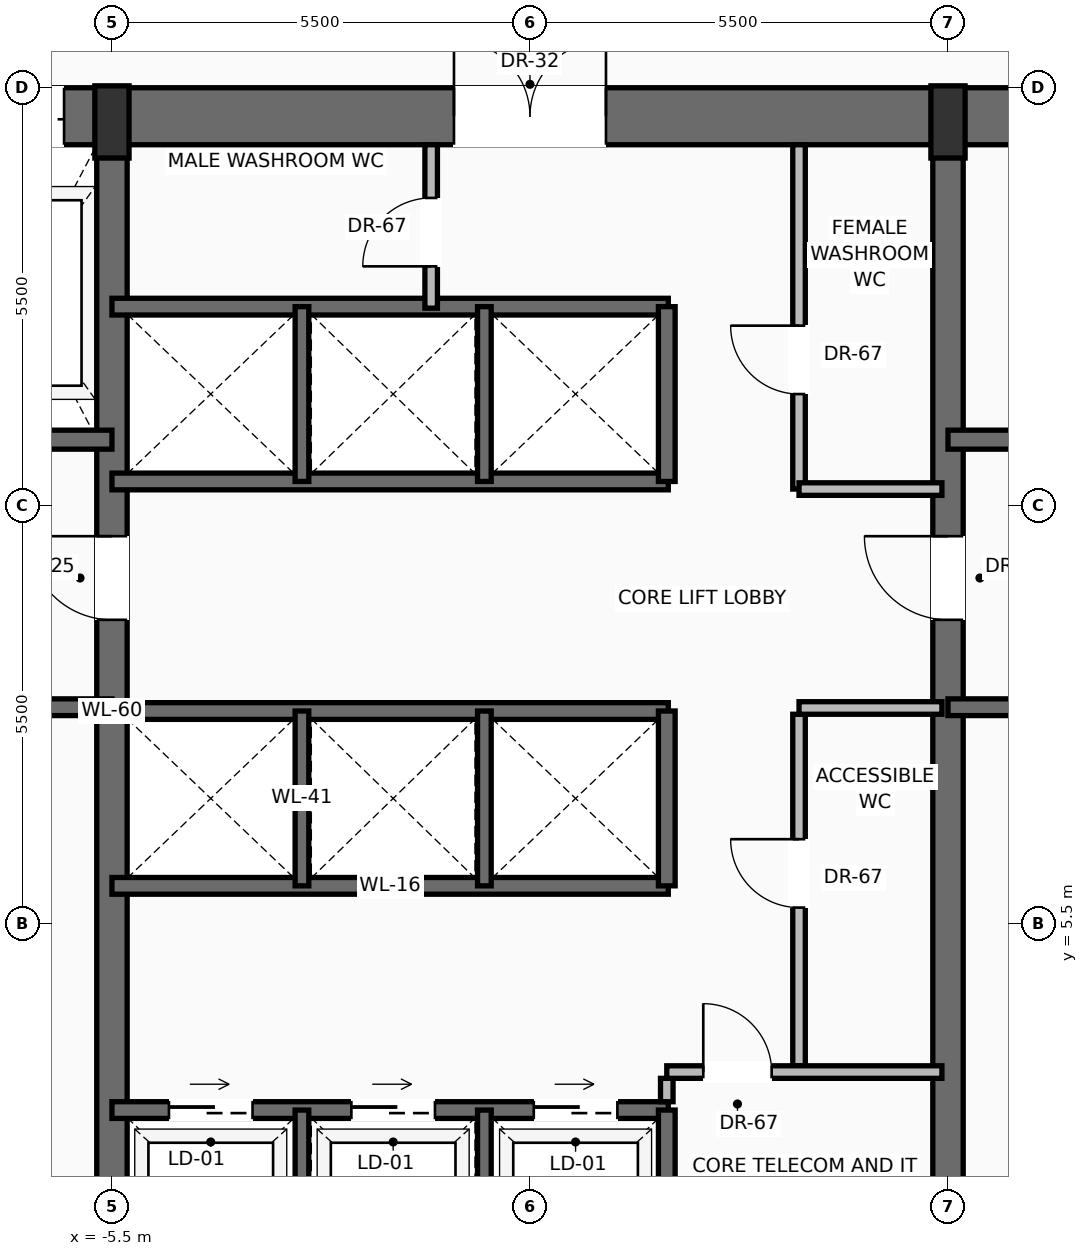
"""IFC4 building model, lengths in metres.
Left out: names, types, materials, properties, quantities, classifications, styles, units other than length and angle.
Written with IfcOpenShell. Run it as: python <this file> out.ifc"""

import sys

from ifc_helpers import new_model, si_unit, direction, frame, frame_2d, origin, origin_2d, place, context, subcontext, project, spatial, rectangle, extrude, source, transform, mapped, element, fill, save


model = new_model("IFC4")
c1 = context("Model", 3, precision=1e-05, world=origin(), true_north=direction((0.0, 1.0)))
c2 = subcontext(c1, "Body", "Model", "MODEL_VIEW")
j1 = project(units=[si_unit("LENGTHUNIT", "METRE"), si_unit("PLANEANGLEUNIT", "RADIAN")], contexts=[c1])
p1 = place(None, origin())
s1 = spatial("IfcSite", under=j1, at=p1, CompositionType="ELEMENT")
p2 = place(p1, origin())
s2 = spatial("IfcBuilding", under=s1, at=p2, CompositionType="ELEMENT")
p3 = place(p2, frame((0.0, 0.0, 106.2)))
s3 = spatial("IfcBuildingStorey", under=s2, at=p3, CompositionType="ELEMENT", Elevation=106.2)
p4 = place(p3, frame((-10.9, 16.125, 0.0), z_axis=(0.0, 0.0, 1.0), x_axis=(1.0, 0.0, 0.0)))
e1 = element("IfcWall", 1, at=p4, inside=s3, PredefinedType="SHEAR", context=c2, shape_type="SweptSolid", body=[
    extrude(rectangle(XDim=21.8, YDim=0.75, at=frame_2d((10.9, 0.0))), origin(), (0.0, 0.0, 1.0), 3.45),
])
p5 = place(p4, frame((3.47, 0.0, 0.0)))
e2 = element("IfcOpeningElement", 2, at=p5, cuts=e1, PredefinedType="OPENING", context=c2, shape_type="SweptSolid", body=[
    extrude(rectangle(XDim=1.3, YDim=2.3, at=frame_2d((0.65, 1.15))), frame((0.0, 0.385, 0.0), z_axis=(0.0, -1.0, 0.0), x_axis=(1.0, 0.0, 0.0)), (0.0, 0.0, 1.0), 0.77),
])
p6 = place(p4, frame((9.9, 0.0, 0.0)))
e3 = element("IfcOpeningElement", 3, at=p6, cuts=e1, PredefinedType="OPENING", context=c2, shape_type="SweptSolid", body=[
    extrude(rectangle(XDim=2.0, YDim=2.4, at=frame_2d((1.0, 1.2))), frame((0.0, 0.385, 0.0), z_axis=(0.0, -1.0, 0.0), x_axis=(1.0, 0.0, 0.0)), (0.0, 0.0, 1.0), 0.77),
])
p7 = place(p3, frame((-5.5, 0.475, 0.0), z_axis=(0.0, 0.0, 1.0), x_axis=(0.0, 1.0, 0.0)))
e4 = element("IfcWall", 4, at=p7, inside=s3, PredefinedType="SHEAR", context=c2, shape_type="SweptSolid", body=[
    extrude(rectangle(XDim=15.65, YDim=0.4, at=frame_2d((7.825, 0.0))), origin(), (0.0, 0.0, 1.0), 3.45),
])
p8 = place(p7, frame((9.025, 0.0, 0.0)))
e5 = element("IfcOpeningElement", 5, at=p8, cuts=e4, PredefinedType="OPENING", context=c2, shape_type="SweptSolid", body=[
    extrude(rectangle(XDim=1.1, YDim=2.2, at=frame_2d((0.55, 1.1))), frame((0.0, 0.21, 0.0), z_axis=(0.0, -1.0, 0.0), x_axis=(1.0, 0.0, 0.0)), (0.0, 0.0, 1.0), 0.42),
])
p9 = place(p3, frame((5.5, 0.475, 0.0), z_axis=(0.0, 0.0, 1.0), x_axis=(0.0, 1.0, 0.0)))
e6 = element("IfcWall", 6, at=p9, inside=s3, PredefinedType="SHEAR", context=c2, shape_type="SweptSolid", body=[
    extrude(rectangle(XDim=15.65, YDim=0.4, at=frame_2d((7.825, 0.0))), origin(), (0.0, 0.0, 1.0), 3.45),
])
p10 = place(p9, frame((9.025, 0.0, 0.0)))
e7 = element("IfcOpeningElement", 7, at=p10, cuts=e6, PredefinedType="OPENING", context=c2, shape_type="SweptSolid", body=[
    extrude(rectangle(XDim=1.1, YDim=2.2, at=frame_2d((0.55, 1.1))), frame((0.0, 0.21, 0.0), z_axis=(0.0, -1.0, 0.0), x_axis=(1.0, 0.0, 0.0)), (0.0, 0.0, 1.0), 0.42),
])
m1 = source(origin(), c2, "Body", "SweptSolid", [
    extrude(rectangle(XDim=0.45, YDim=0.95, at=origin_2d()), origin(), (0.0, 0.0, 1.0), 3.7),
])
for number, where, z_axis, x_axis in (
    (8, (-5.5, 16.05, 0.0), (0.0, 0.0, 1.0), (1.0, 0.0, 0.0)),
    (9, (5.5, 16.05, 0.0), (0.0, 0.0, 1.0), (1.0, 0.0, 0.0)),
):
    element("IfcColumn", number, at=place(p3, frame(where, z_axis=z_axis, x_axis=x_axis)), inside=s3, PredefinedType="PILASTER", context=c2, shape_type="MappedRepresentation", body=[
        mapped(m1, transform((0.0, 0.0, 0.0), scale=1.0)),
    ])
p11 = place(p3, frame((-5.5, 8.35, 0.0), z_axis=(0.0, 0.0, 1.0), x_axis=(-1.0, 0.0, 0.0)))
e10 = element("IfcWall", 10, at=p11, inside=s3, PredefinedType="SOLIDWALL", context=c2, shape_type="SweptSolid", body=[
    extrude(rectangle(XDim=4.65, YDim=0.22, at=frame_2d((2.325, 0.0))), origin(), (0.0, 0.0, 1.0), 3.45),
])
p12 = place(p11, frame((2.5, 0.0, 0.0)))
e11 = element("IfcOpeningElement", 11, at=p12, cuts=e10, PredefinedType="OPENING", context=c2, shape_type="SweptSolid", body=[
    extrude(rectangle(XDim=1.15, YDim=2.2, at=frame_2d((0.575, 1.1))), frame((0.0, 0.12, 0.0), z_axis=(0.0, -1.0, 0.0), x_axis=(1.0, 0.0, 0.0)), (0.0, 0.0, 1.0), 0.24),
])
p13 = place(p3, frame((-5.5, 11.87, 0.0), z_axis=(0.0, 0.0, 1.0), x_axis=(-1.0, 0.0, 0.0)))
e12 = element("IfcWall", 12, at=p13, inside=s3, PredefinedType="SOLIDWALL", context=c2, shape_type="SweptSolid", body=[
    extrude(rectangle(XDim=4.65, YDim=0.25, at=frame_2d((2.325, 0.0))), origin(), (0.0, 0.0, 1.0), 3.45),
])
p14 = place(p13, frame((2.95, 0.0, 0.0)))
e13 = element("IfcOpeningElement", 13, at=p14, cuts=e12, PredefinedType="OPENING", context=c2, shape_type="SweptSolid", body=[
    extrude(rectangle(XDim=1.2, YDim=2.25, at=frame_2d((0.6, 1.125))), frame((0.0, 0.135, 0.0), z_axis=(0.0, -1.0, 0.0), x_axis=(1.0, 0.0, 0.0)), (0.0, 0.0, 1.0), 0.27),
])
p15 = place(p3, frame((10.15, 8.35, 0.0), z_axis=(0.0, 0.0, 1.0), x_axis=(-1.0, 0.0, 0.0)))
e14 = element("IfcWall", 14, at=p15, inside=s3, PredefinedType="SOLIDWALL", context=c2, shape_type="SweptSolid", body=[
    extrude(rectangle(XDim=4.65, YDim=0.22, at=frame_2d((2.325, 0.0))), origin(), (0.0, 0.0, 1.0), 3.45),
])
p16 = place(p15, frame((1.0, 0.0, 0.0)))
e15 = element("IfcOpeningElement", 15, at=p16, cuts=e14, PredefinedType="OPENING", context=c2, shape_type="SweptSolid", body=[
    extrude(rectangle(XDim=1.15, YDim=2.2, at=frame_2d((0.575, 1.1))), frame((0.0, 0.12, 0.0), z_axis=(0.0, -1.0, 0.0), x_axis=(1.0, 0.0, 0.0)), (0.0, 0.0, 1.0), 0.24),
])
p17 = place(p3, frame((10.15, 11.87, 0.0), z_axis=(0.0, 0.0, 1.0), x_axis=(-1.0, 0.0, 0.0)))
e16 = element("IfcWall", 16, at=p17, inside=s3, PredefinedType="SOLIDWALL", context=c2, shape_type="SweptSolid", body=[
    extrude(rectangle(XDim=4.65, YDim=0.25, at=frame_2d((2.325, 0.0))), origin(), (0.0, 0.0, 1.0), 3.45),
])
p18 = place(p17, frame((0.5, 0.0, 0.0)))
e17 = element("IfcOpeningElement", 17, at=p18, cuts=e16, PredefinedType="OPENING", context=c2, shape_type="SweptSolid", body=[
    extrude(rectangle(XDim=1.2, YDim=2.25, at=frame_2d((0.6, 1.125))), frame((0.0, 0.135, 0.0), z_axis=(0.0, -1.0, 0.0), x_axis=(1.0, 0.0, 0.0)), (0.0, 0.0, 1.0), 0.27),
])
p19 = place(p3, frame((-5.5, 3.05, 0.0), z_axis=(0.0, 0.0, 1.0), x_axis=(1.0, 0.0, 0.0)))
e18 = element("IfcWall", 18, at=p19, inside=s3, PredefinedType="SOLIDWALL", context=c2, shape_type="SweptSolid", body=[
    extrude(rectangle(XDim=7.32, YDim=0.22, at=frame_2d((3.66, 0.0))), origin(), (0.0, 0.0, 1.0), 3.45),
])
p20 = place(p19, frame((0.75, 0.0, 0.0)))
e19 = element("IfcOpeningElement", 19, at=p20, cuts=e18, PredefinedType="OPENING", context=c2, shape_type="SweptSolid", body=[
    extrude(rectangle(XDim=1.1, YDim=2.2, at=frame_2d((0.55, 1.1))), frame((0.0, 0.12, 0.0), z_axis=(0.0, -1.0, 0.0), x_axis=(1.0, 0.0, 0.0)), (0.0, 0.0, 1.0), 0.24),
])
p21 = place(p19, frame((3.15, 0.0, 0.0)))
e20 = element("IfcOpeningElement", 20, at=p21, cuts=e18, PredefinedType="OPENING", context=c2, shape_type="SweptSolid", body=[
    extrude(rectangle(XDim=1.1, YDim=2.2, at=frame_2d((0.55, 1.1))), frame((0.0, 0.12, 0.0), z_axis=(0.0, -1.0, 0.0), x_axis=(1.0, 0.0, 0.0)), (0.0, 0.0, 1.0), 0.24),
])
p22 = place(p19, frame((5.55, 0.0, 0.0)))
e21 = element("IfcOpeningElement", 21, at=p22, cuts=e18, PredefinedType="OPENING", context=c2, shape_type="SweptSolid", body=[
    extrude(rectangle(XDim=1.1, YDim=2.2, at=frame_2d((0.55, 1.1))), frame((0.0, 0.12, 0.0), z_axis=(0.0, -1.0, 0.0), x_axis=(1.0, 0.0, 0.0)), (0.0, 0.0, 1.0), 0.24),
])
p23 = place(p3, frame((1.8, 0.85, 0.0), z_axis=(0.0, 0.0, 1.0), x_axis=(0.0, 1.0, 0.0)))
e22 = element("IfcWall", 22, at=p23, inside=s3, PredefinedType="SOLIDWALL", context=c2, shape_type="SweptSolid", body=[
    extrude(rectangle(XDim=2.2, YDim=0.22, at=frame_2d((1.1, 0.0))), origin(), (0.0, 0.0, 1.0), 3.45),
])
for number, where, z_axis, x_axis in (
    (23, (-3.0, 0.85, 0.0), (0.0, 0.0, 1.0), (0.0, 1.0, 0.0)),
    (24, (-0.6, 0.85, 0.0), (0.0, 0.0, 1.0), (0.0, 1.0, 0.0)),
):
    element("IfcWall", number, at=place(p3, frame(where, z_axis=z_axis, x_axis=x_axis)), inside=s3, PredefinedType="SOLIDWALL", context=c2, shape_type="SweptSolid", body=[
        extrude(rectangle(XDim=2.2, YDim=0.18, at=frame_2d((1.1, 0.0))), origin(), (0.0, 0.0, 1.0), 3.45),
    ])
p24 = place(p3, frame((1.8, 3.16, 0.0), z_axis=(0.0, 0.0, 1.0), x_axis=(0.0, 1.0, 0.0)))
e25 = element("IfcWall", 25, at=p24, inside=s3, PredefinedType="PARTITIONING", context=c2, shape_type="SweptSolid", body=[
    extrude(rectangle(XDim=0.308, YDim=0.165, at=frame_2d((0.154, 0.0))), origin(), (0.0, 0.0, 1.0), 3.442),
])
p25 = place(p3, frame((3.54, 3.633, 0.0), z_axis=(0.0, 0.0, 1.0), x_axis=(0.0, 1.0, 0.0)))
e26 = element("IfcWall", 26, at=p25, inside=s3, PredefinedType="PARTITIONING", context=c2, shape_type="SweptSolid", body=[
    extrude(rectangle(XDim=4.625, YDim=0.165, at=frame_2d((2.312, 0.0))), origin(), (0.0, 0.0, 1.0), 3.442),
])
p26 = place(p25, frame((2.081, 0.0, 0.0)))
e27 = element("IfcOpeningElement", 27, at=p26, cuts=e26, PredefinedType="OPENING", context=c2, shape_type="SweptSolid", body=[
    extrude(rectangle(XDim=0.9, YDim=2.1, at=frame_2d((0.45, 1.05))), frame((0.0, 0.093, 0.0), z_axis=(0.0, -1.0, 0.0), x_axis=(1.0, 0.0, 0.0)), (0.0, 0.0, 1.0), 0.185),
])
p27 = place(p3, frame((3.54, 8.34, 0.0), z_axis=(0.0, 0.0, 1.0), x_axis=(1.0, 0.0, 0.0)))
e28 = element("IfcWall", 28, at=p27, inside=s3, PredefinedType="PARTITIONING", context=c2, shape_type="SweptSolid", body=[
    extrude(rectangle(XDim=1.88, YDim=0.165, at=frame_2d((0.94, 0.0))), origin(), (0.0, 0.0, 1.0), 3.442),
])
p28 = place(p3, frame((1.8, 3.55, 0.0), z_axis=(0.0, 0.0, 1.0), x_axis=(1.0, 0.0, 0.0)))
e29 = element("IfcWall", 29, at=p28, inside=s3, PredefinedType="PARTITIONING", context=c2, shape_type="SweptSolid", body=[
    extrude(rectangle(XDim=3.62, YDim=0.165, at=frame_2d((1.81, 0.0))), origin(), (0.0, 0.0, 1.0), 3.442),
])
p29 = place(p28, frame((0.48, 0.0, 0.0)))
e30 = element("IfcOpeningElement", 30, at=p29, cuts=e29, PredefinedType="OPENING", context=c2, shape_type="SweptSolid", body=[
    extrude(rectangle(XDim=0.9, YDim=2.1, at=frame_2d((0.45, 1.05))), frame((0.0, 0.093, 0.0), z_axis=(0.0, -1.0, 0.0), x_axis=(1.0, 0.0, 0.0)), (0.0, 0.0, 1.0), 0.185),
])
for number, where, z_axis, x_axis in (
    (31, (-5.5, 6.0, 0.0), (0.0, 0.0, 1.0), (1.0, 0.0, 0.0)),
    (32, (-5.5, 8.3, 0.0), (0.0, 0.0, 1.0), (1.0, 0.0, 0.0)),
):
    element("IfcWall", number, at=place(p3, frame(where, z_axis=z_axis, x_axis=x_axis)), inside=s3, PredefinedType="SOLIDWALL", context=c2, shape_type="SweptSolid", body=[
        extrude(rectangle(XDim=7.32, YDim=0.22, at=frame_2d((3.66, 0.0))), origin(), (0.0, 0.0, 1.0), 3.45),
    ])
p30 = place(p3, frame((1.8, 6.0, 0.0), z_axis=(0.0, 0.0, 1.0), x_axis=(0.0, 1.0, 0.0)))
e33 = element("IfcWall", 33, at=p30, inside=s3, PredefinedType="SOLIDWALL", context=c2, shape_type="SweptSolid", body=[
    extrude(rectangle(XDim=2.3, YDim=0.22, at=frame_2d((1.15, 0.0))), origin(), (0.0, 0.0, 1.0), 3.45),
])
for number, where, z_axis, x_axis in (
    (34, (-3.0, 6.0, 0.0), (0.0, 0.0, 1.0), (0.0, 1.0, 0.0)),
    (35, (-0.6, 6.0, 0.0), (0.0, 0.0, 1.0), (0.0, 1.0, 0.0)),
):
    element("IfcWall", number, at=place(p3, frame(where, z_axis=z_axis, x_axis=x_axis)), inside=s3, PredefinedType="SOLIDWALL", context=c2, shape_type="SweptSolid", body=[
        extrude(rectangle(XDim=2.3, YDim=0.18, at=frame_2d((1.15, 0.0))), origin(), (0.0, 0.0, 1.0), 3.45),
    ])
for number, where, z_axis, x_axis in (
    (36, (-5.5, 11.32, 0.0), (0.0, 0.0, 1.0), (1.0, 0.0, 0.0)),
    (37, (-5.5, 13.62, 0.0), (0.0, 0.0, 1.0), (1.0, 0.0, 0.0)),
):
    element("IfcWall", number, at=place(p3, frame(where, z_axis=z_axis, x_axis=x_axis)), inside=s3, PredefinedType="SOLIDWALL", context=c2, shape_type="SweptSolid", body=[
        extrude(rectangle(XDim=7.32, YDim=0.22, at=frame_2d((3.66, 0.0))), origin(), (0.0, 0.0, 1.0), 3.45),
    ])
p31 = place(p3, frame((1.8, 11.32, 0.0), z_axis=(0.0, 0.0, 1.0), x_axis=(0.0, 1.0, 0.0)))
e38 = element("IfcWall", 38, at=p31, inside=s3, PredefinedType="SOLIDWALL", context=c2, shape_type="SweptSolid", body=[
    extrude(rectangle(XDim=2.3, YDim=0.22, at=frame_2d((1.15, 0.0))), origin(), (0.0, 0.0, 1.0), 3.45),
])
for number, where, z_axis, x_axis in (
    (39, (-3.0, 11.32, 0.0), (0.0, 0.0, 1.0), (0.0, 1.0, 0.0)),
    (40, (-0.6, 11.32, 0.0), (0.0, 0.0, 1.0), (0.0, 1.0, 0.0)),
):
    element("IfcWall", number, at=place(p3, frame(where, z_axis=z_axis, x_axis=x_axis)), inside=s3, PredefinedType="SOLIDWALL", context=c2, shape_type="SweptSolid", body=[
        extrude(rectangle(XDim=2.3, YDim=0.18, at=frame_2d((1.15, 0.0))), origin(), (0.0, 0.0, 1.0), 3.45),
    ])
p32 = place(p3, frame((-1.3, 13.6, 0.0), z_axis=(0.0, 0.0, 1.0), x_axis=(0.0, 1.0, 0.0)))
e41 = element("IfcWall", 41, at=p32, inside=s3, PredefinedType="PARTITIONING", context=c2, shape_type="SweptSolid", body=[
    extrude(rectangle(XDim=2.15, YDim=0.165, at=frame_2d((1.075, 0.0))), origin(), (0.0, 0.0, 1.0), 3.442),
])
p33 = place(p32, frame((0.55, 0.0, 0.0)))
e42 = element("IfcOpeningElement", 42, at=p33, cuts=e41, PredefinedType="OPENING", context=c2, shape_type="SweptSolid", body=[
    extrude(rectangle(XDim=0.9, YDim=2.1, at=frame_2d((0.45, 1.05))), frame((0.0, 0.093, 0.0), z_axis=(0.0, -1.0, 0.0), x_axis=(1.0, 0.0, 0.0)), (0.0, 0.0, 1.0), 0.185),
])
p34 = place(p3, frame((3.54, 11.22, 0.0), z_axis=(0.0, 0.0, 1.0), x_axis=(0.0, 1.0, 0.0)))
e43 = element("IfcWall", 43, at=p34, inside=s3, PredefinedType="PARTITIONING", context=c2, shape_type="SweptSolid", body=[
    extrude(rectangle(XDim=4.53, YDim=0.165, at=frame_2d((2.265, 0.0))), origin(), (0.0, 0.0, 1.0), 3.442),
])
p35 = place(p34, frame((1.25, 0.0, 0.0)))
e44 = element("IfcOpeningElement", 44, at=p35, cuts=e43, PredefinedType="OPENING", context=c2, shape_type="SweptSolid", body=[
    extrude(rectangle(XDim=0.9, YDim=2.1, at=frame_2d((0.45, 1.05))), frame((0.0, 0.093, 0.0), z_axis=(0.0, -1.0, 0.0), x_axis=(1.0, 0.0, 0.0)), (0.0, 0.0, 1.0), 0.185),
])
p36 = place(p3, frame((3.54, 11.22, 0.0), z_axis=(0.0, 0.0, 1.0), x_axis=(1.0, 0.0, 0.0)))
e45 = element("IfcWall", 45, at=p36, inside=s3, PredefinedType="PARTITIONING", context=c2, shape_type="SweptSolid", body=[
    extrude(rectangle(XDim=1.88, YDim=0.165, at=frame_2d((0.94, 0.0))), origin(), (0.0, 0.0, 1.0), 3.442),
])
m2 = source(origin(), c2, "Body", "SweptSolid", [
    extrude(rectangle(XDim=1.1, YDim=2.2, at=frame_2d((0.55, 1.1))), frame((0.0, 0.025, 0.0), z_axis=(0.0, -1.0, 0.0), x_axis=(1.0, 0.0, 0.0)), (0.0, 0.0, 1.0), 0.05),
])
p37 = place(p8, origin())
e46 = element("IfcDoor", 46, at=p37, inside=s3, OperationType="SINGLE_SWING_RIGHT", PredefinedType="DOOR", context=c2, shape_type="MappedRepresentation", body=[
    mapped(m2, transform((0.0, 0.0, 0.0), scale=1.0)),
])
fill(e5, e46)
m3 = source(origin(), c2, "Body", "SweptSolid", [
    extrude(rectangle(XDim=1.3, YDim=2.3, at=frame_2d((0.65, 1.15))), frame((0.0, 0.025, 0.0), z_axis=(0.0, -1.0, 0.0), x_axis=(1.0, 0.0, 0.0)), (0.0, 0.0, 1.0), 0.05),
])
p38 = place(p5, origin())
e47 = element("IfcDoor", 47, at=p38, inside=s3, OperationType="SLIDING_TO_RIGHT", PredefinedType="DOOR", context=c2, shape_type="MappedRepresentation", body=[
    mapped(m3, transform((0.0, 0.0, 0.0), scale=1.0)),
])
fill(e2, e47)
p39 = place(p10, origin())
e48 = element("IfcDoor", 48, at=p39, inside=s3, OperationType="SINGLE_SWING_RIGHT", PredefinedType="DOOR", context=c2, shape_type="MappedRepresentation", body=[
    mapped(m2, transform((0.0, 0.0, 0.0), scale=1.0)),
])
fill(e7, e48)
m4 = source(origin(), c2, "Body", "SweptSolid", [
    extrude(rectangle(XDim=2.0, YDim=2.4, at=frame_2d((1.0, 1.2))), frame((0.0, 0.025, 0.0), z_axis=(0.0, -1.0, 0.0), x_axis=(1.0, 0.0, 0.0)), (0.0, 0.0, 1.0), 0.05),
])
p40 = place(p6, origin())
e49 = element("IfcDoor", 49, at=p40, inside=s3, OperationType="DOUBLE_DOOR_SINGLE_SWING", PredefinedType="DOOR", context=c2, shape_type="MappedRepresentation", body=[
    mapped(m4, transform((0.0, 0.0, 0.0), scale=1.0)),
])
fill(e3, e49)
m5 = source(origin(), c2, "Body", "SweptSolid", [
    extrude(rectangle(XDim=1.1, YDim=2.2, at=frame_2d((0.55, 1.1))), frame((0.0, 0.025, 0.0), z_axis=(0.0, -1.0, 0.0), x_axis=(1.0, 0.0, 0.0)), (0.0, 0.0, 1.0), 0.05),
])
p41 = place(p20, origin())
e50 = element("IfcDoor", 50, at=p41, inside=s3, OperationType="SLIDING_TO_RIGHT", PredefinedType="DOOR", context=c2, shape_type="MappedRepresentation", body=[
    mapped(m5, transform((0.0, 0.0, 0.0), scale=1.0)),
])
fill(e19, e50)
p42 = place(p21, origin())
e51 = element("IfcDoor", 51, at=p42, inside=s3, OperationType="SLIDING_TO_RIGHT", PredefinedType="DOOR", context=c2, shape_type="MappedRepresentation", body=[
    mapped(m5, transform((0.0, 0.0, 0.0), scale=1.0)),
])
fill(e20, e51)
p43 = place(p22, origin())
e52 = element("IfcDoor", 52, at=p43, inside=s3, OperationType="SLIDING_TO_RIGHT", PredefinedType="DOOR", context=c2, shape_type="MappedRepresentation", body=[
    mapped(m5, transform((0.0, 0.0, 0.0), scale=1.0)),
])
fill(e21, e52)
m6 = source(origin(), c2, "Body", "SweptSolid", [
    extrude(rectangle(XDim=0.9, YDim=2.1, at=frame_2d((0.45, 1.05))), frame((0.0, 0.025, 0.0), z_axis=(0.0, -1.0, 0.0), x_axis=(1.0, 0.0, 0.0)), (0.0, 0.0, 1.0), 0.05),
])
p44 = place(p29, origin())
e53 = element("IfcDoor", 53, at=p44, inside=s3, OperationType="SINGLE_SWING_LEFT", PredefinedType="DOOR", context=c2, shape_type="MappedRepresentation", body=[
    mapped(m6, transform((0.0, 0.0, 0.0), scale=1.0)),
])
fill(e30, e53)
p45 = place(p26, origin())
e54 = element("IfcDoor", 54, at=p45, inside=s3, OperationType="SINGLE_SWING_RIGHT", PredefinedType="DOOR", context=c2, shape_type="MappedRepresentation", body=[
    mapped(m6, transform((0.0, 0.0, 0.0), scale=1.0)),
])
fill(e27, e54)
p46 = place(p33, origin())
e55 = element("IfcDoor", 55, at=p46, inside=s3, OperationType="SINGLE_SWING_LEFT", PredefinedType="DOOR", context=c2, shape_type="MappedRepresentation", body=[
    mapped(m6, transform((0.0, 0.0, 0.0), scale=1.0)),
])
fill(e42, e55)
p47 = place(p35, origin())
e56 = element("IfcDoor", 56, at=p47, inside=s3, OperationType="SINGLE_SWING_RIGHT", PredefinedType="DOOR", context=c2, shape_type="MappedRepresentation", body=[
    mapped(m6, transform((0.0, 0.0, 0.0), scale=1.0)),
])
fill(e44, e56)
save(model, sys.argv[1])
